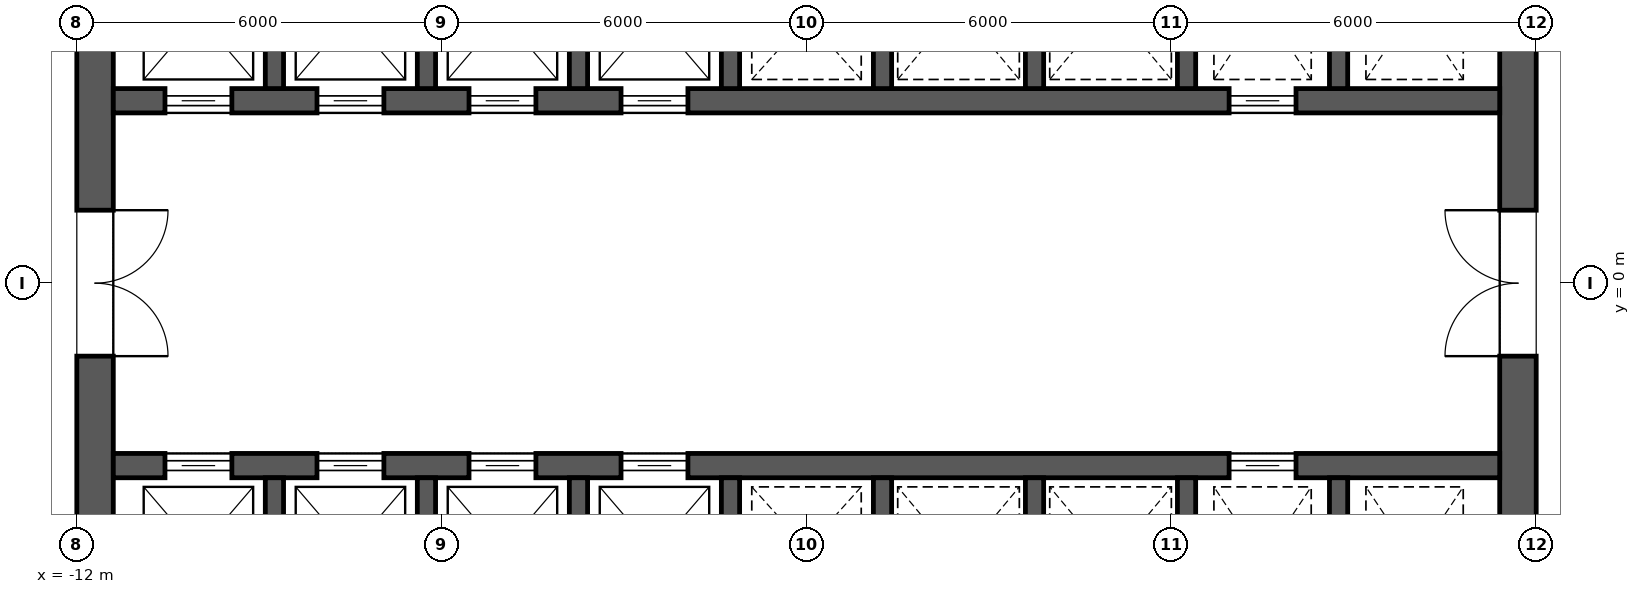
"""IFC4 building model, lengths in metres.
Left out: names, types, materials, properties, quantities, classifications, styles, units other than length and angle.
Written with IfcOpenShell. Run it as: python <this file> out.ifc"""

import sys

from ifc_helpers import new_model, si_unit, direction, frame, frame_2d, origin, place, context, subcontext, project, spatial, rectangle, extrude, element, fill, save


model = new_model("IFC4")
c1 = context("Model", 3, precision=1e-05, world=origin(), true_north=direction((0.0, 1.0)))
c2 = subcontext(c1, "Body", "Model", "MODEL_VIEW")
j1 = project(units=[si_unit("LENGTHUNIT", "METRE"), si_unit("PLANEANGLEUNIT", "RADIAN")], contexts=[c1])
p1 = place(None, origin())
s1 = spatial("IfcSite", under=j1, at=p1, CompositionType="ELEMENT")
p2 = place(p1, origin())
s2 = spatial("IfcBuilding", under=s1, at=p2, CompositionType="ELEMENT")
p3 = place(p2, frame((0.0, 0.0, 44.5)))
s3 = spatial("IfcBuildingStorey", under=s2, at=p3, CompositionType="ELEMENT", Elevation=44.5)
p4 = place(p3, frame((11.7, -11.4, 0.0), z_axis=(0.0, 0.0, 1.0), x_axis=(0.0, 1.0, 0.0)))
e1 = element("IfcWall", 1, at=p4, inside=s3, PredefinedType="SHEAR", context=c2, shape_type="SweptSolid", body=[
    extrude(rectangle(XDim=22.8, YDim=0.6, at=frame_2d((11.4, 0.0))), origin(), (0.0, 0.0, 1.0), 4.2),
])
p5 = place(p4, frame((10.2, 0.0, 0.0)))
e2 = element("IfcOpeningElement", 2, at=p5, cuts=e1, PredefinedType="OPENING", context=c2, shape_type="SweptSolid", body=[
    extrude(rectangle(XDim=2.4, YDim=2.1, at=frame_2d((1.2, 1.05))), frame((0.0, 0.312, 0.0), z_axis=(0.0, -1.0, 0.0), x_axis=(1.0, 0.0, 0.0)), (0.0, 0.0, 1.0), 0.624),
])
p6 = place(p4, frame((19.5, 0.0, 0.0)))
e3 = element("IfcOpeningElement", 3, at=p6, cuts=e1, PredefinedType="OPENING", context=c2, shape_type="SweptSolid", body=[
    extrude(rectangle(XDim=1.2, YDim=2.1, at=frame_2d((0.6, 1.05))), frame((0.0, 0.312, 0.0), z_axis=(0.0, -1.0, 0.0), x_axis=(1.0, 0.0, 0.0)), (0.0, 0.0, 1.0), 0.624),
])
p7 = place(p4, frame((2.1, 0.0, 0.0)))
e4 = element("IfcOpeningElement", 4, at=p7, cuts=e1, PredefinedType="OPENING", context=c2, shape_type="SweptSolid", body=[
    extrude(rectangle(XDim=1.2, YDim=2.1, at=frame_2d((0.6, 1.05))), frame((0.0, 0.312, 0.0), z_axis=(0.0, -1.0, 0.0), x_axis=(1.0, 0.0, 0.0)), (0.0, 0.0, 1.0), 0.624),
])
p8 = place(p3, frame((-11.7, -11.4, 0.0), z_axis=(0.0, 0.0, 1.0), x_axis=(0.0, 1.0, 0.0)))
e5 = element("IfcWall", 5, at=p8, inside=s3, PredefinedType="SHEAR", context=c2, shape_type="SweptSolid", body=[
    extrude(rectangle(XDim=22.8, YDim=0.6, at=frame_2d((11.4, 0.0))), origin(), (0.0, 0.0, 1.0), 4.2),
])
p9 = place(p8, frame((10.2, 0.0, 0.0)))
e6 = element("IfcOpeningElement", 6, at=p9, cuts=e5, PredefinedType="OPENING", context=c2, shape_type="SweptSolid", body=[
    extrude(rectangle(XDim=2.4, YDim=2.1, at=frame_2d((1.2, 1.05))), frame((0.0, 0.312, 0.0), z_axis=(0.0, -1.0, 0.0), x_axis=(1.0, 0.0, 0.0)), (0.0, 0.0, 1.0), 0.624),
])
p10 = place(p8, frame((18.925, 0.0, 0.0)))
e7 = element("IfcOpeningElement", 7, at=p10, cuts=e5, PredefinedType="OPENING", context=c2, shape_type="SweptSolid", body=[
    extrude(rectangle(XDim=1.2, YDim=2.1, at=frame_2d((0.6, 1.05))), frame((0.0, 0.312, 0.0), z_axis=(0.0, -1.0, 0.0), x_axis=(1.0, 0.0, 0.0)), (0.0, 0.0, 1.0), 0.624),
])
p11 = place(p8, frame((2.675, 0.0, 0.0)))
e8 = element("IfcOpeningElement", 8, at=p11, cuts=e5, PredefinedType="OPENING", context=c2, shape_type="SweptSolid", body=[
    extrude(rectangle(XDim=1.2, YDim=2.1, at=frame_2d((0.6, 1.05))), frame((0.0, 0.312, 0.0), z_axis=(0.0, -1.0, 0.0), x_axis=(1.0, 0.0, 0.0)), (0.0, 0.0, 1.0), 0.624),
])
p12 = place(p3, frame((-11.4, 3.0, 0.0), z_axis=(0.0, 0.0, 1.0), x_axis=(1.0, 0.0, 0.0)))
e9 = element("IfcWall", 9, at=p12, inside=s3, PredefinedType="SHEAR", context=c2, shape_type="SweptSolid", body=[
    extrude(rectangle(XDim=22.8, YDim=0.4, at=frame_2d((11.4, 0.0))), origin(), (0.0, 0.0, 1.0), 4.2),
])
p13 = place(p12, frame((0.85, 0.0, 0.0)))
e10 = element("IfcOpeningElement", 10, at=p13, cuts=e9, PredefinedType="OPENING", context=c2, shape_type="SweptSolid", body=[
    extrude(rectangle(XDim=1.1, YDim=2.1, at=frame_2d((0.55, 1.05))), frame((0.0, 0.212, 0.0), z_axis=(0.0, -1.0, 0.0), x_axis=(1.0, 0.0, 0.0)), (0.0, 0.0, 1.0), 0.424),
])
p14 = place(p12, frame((3.35, 0.0, 0.0)))
e11 = element("IfcOpeningElement", 11, at=p14, cuts=e9, PredefinedType="OPENING", context=c2, shape_type="SweptSolid", body=[
    extrude(rectangle(XDim=1.1, YDim=2.1, at=frame_2d((0.55, 1.05))), frame((0.0, 0.212, 0.0), z_axis=(0.0, -1.0, 0.0), x_axis=(1.0, 0.0, 0.0)), (0.0, 0.0, 1.0), 0.424),
])
p15 = place(p12, frame((5.85, 0.0, 0.0)))
e12 = element("IfcOpeningElement", 12, at=p15, cuts=e9, PredefinedType="OPENING", context=c2, shape_type="SweptSolid", body=[
    extrude(rectangle(XDim=1.1, YDim=2.1, at=frame_2d((0.55, 1.05))), frame((0.0, 0.212, 0.0), z_axis=(0.0, -1.0, 0.0), x_axis=(1.0, 0.0, 0.0)), (0.0, 0.0, 1.0), 0.424),
])
p16 = place(p12, frame((8.35, 0.0, 0.0)))
e13 = element("IfcOpeningElement", 13, at=p16, cuts=e9, PredefinedType="OPENING", context=c2, shape_type="SweptSolid", body=[
    extrude(rectangle(XDim=1.1, YDim=2.1, at=frame_2d((0.55, 1.05))), frame((0.0, 0.212, 0.0), z_axis=(0.0, -1.0, 0.0), x_axis=(1.0, 0.0, 0.0)), (0.0, 0.0, 1.0), 0.424),
])
p17 = place(p12, frame((18.35, 0.0, 0.0)))
e14 = element("IfcOpeningElement", 14, at=p17, cuts=e9, PredefinedType="OPENING", context=c2, shape_type="SweptSolid", body=[
    extrude(rectangle(XDim=1.1, YDim=2.1, at=frame_2d((0.55, 1.05))), frame((0.0, 0.212, 0.0), z_axis=(0.0, -1.0, 0.0), x_axis=(1.0, 0.0, 0.0)), (0.0, 0.0, 1.0), 0.424),
])
for number, where, z_axis, x_axis in (
    (15, (-8.75, 3.2, 0.0), (0.0, 0.0, 1.0), (0.0, 1.0, 0.0)),
    (16, (-6.25, 3.2, 0.0), (0.0, 0.0, 1.0), (0.0, 1.0, 0.0)),
    (17, (-3.75, 3.2, 0.0), (0.0, 0.0, 1.0), (0.0, 1.0, 0.0)),
    (18, (-1.25, 3.2, 0.0), (0.0, 0.0, 1.0), (0.0, 1.0, 0.0)),
    (19, (1.25, 3.2, 0.0), (0.0, 0.0, 1.0), (0.0, 1.0, 0.0)),
    (20, (3.75, 3.2, 0.0), (0.0, 0.0, 1.0), (0.0, 1.0, 0.0)),
    (21, (6.25, 3.2, 0.0), (0.0, 0.0, 1.0), (0.0, 1.0, 0.0)),
    (22, (8.75, 3.2, 0.0), (0.0, 0.0, 1.0), (0.0, 1.0, 0.0)),
):
    element("IfcWall", number, at=place(p3, frame(where, z_axis=z_axis, x_axis=x_axis)), inside=s3, PredefinedType="SHEAR", context=c2, shape_type="SweptSolid", body=[
        extrude(rectangle(XDim=2.9, YDim=0.3, at=frame_2d((1.45, 0.0))), origin(), (0.0, 0.0, 1.0), 4.2),
    ])
p18 = place(p3, frame((-11.4, -3.0, 0.0), z_axis=(0.0, 0.0, 1.0), x_axis=(1.0, 0.0, 0.0)))
e23 = element("IfcWall", 23, at=p18, inside=s3, PredefinedType="SHEAR", context=c2, shape_type="SweptSolid", body=[
    extrude(rectangle(XDim=22.8, YDim=0.4, at=frame_2d((11.4, 0.0))), origin(), (0.0, 0.0, 1.0), 4.2),
])
p19 = place(p18, frame((0.85, 0.0, 0.0)))
e24 = element("IfcOpeningElement", 24, at=p19, cuts=e23, PredefinedType="OPENING", context=c2, shape_type="SweptSolid", body=[
    extrude(rectangle(XDim=1.1, YDim=2.1, at=frame_2d((0.55, 1.05))), frame((0.0, 0.212, 0.0), z_axis=(0.0, -1.0, 0.0), x_axis=(1.0, 0.0, 0.0)), (0.0, 0.0, 1.0), 0.424),
])
p20 = place(p18, frame((3.35, 0.0, 0.0)))
e25 = element("IfcOpeningElement", 25, at=p20, cuts=e23, PredefinedType="OPENING", context=c2, shape_type="SweptSolid", body=[
    extrude(rectangle(XDim=1.1, YDim=2.1, at=frame_2d((0.55, 1.05))), frame((0.0, 0.212, 0.0), z_axis=(0.0, -1.0, 0.0), x_axis=(1.0, 0.0, 0.0)), (0.0, 0.0, 1.0), 0.424),
])
p21 = place(p18, frame((5.85, 0.0, 0.0)))
e26 = element("IfcOpeningElement", 26, at=p21, cuts=e23, PredefinedType="OPENING", context=c2, shape_type="SweptSolid", body=[
    extrude(rectangle(XDim=1.1, YDim=2.1, at=frame_2d((0.55, 1.05))), frame((0.0, 0.212, 0.0), z_axis=(0.0, -1.0, 0.0), x_axis=(1.0, 0.0, 0.0)), (0.0, 0.0, 1.0), 0.424),
])
p22 = place(p18, frame((8.35, 0.0, 0.0)))
e27 = element("IfcOpeningElement", 27, at=p22, cuts=e23, PredefinedType="OPENING", context=c2, shape_type="SweptSolid", body=[
    extrude(rectangle(XDim=1.1, YDim=2.1, at=frame_2d((0.55, 1.05))), frame((0.0, 0.212, 0.0), z_axis=(0.0, -1.0, 0.0), x_axis=(1.0, 0.0, 0.0)), (0.0, 0.0, 1.0), 0.424),
])
p23 = place(p18, frame((18.35, 0.0, 0.0)))
e28 = element("IfcOpeningElement", 28, at=p23, cuts=e23, PredefinedType="OPENING", context=c2, shape_type="SweptSolid", body=[
    extrude(rectangle(XDim=1.1, YDim=2.1, at=frame_2d((0.55, 1.05))), frame((0.0, 0.212, 0.0), z_axis=(0.0, -1.0, 0.0), x_axis=(1.0, 0.0, 0.0)), (0.0, 0.0, 1.0), 0.424),
])
for number, where, z_axis, x_axis in (
    (29, (-8.75, -6.1, 0.0), (0.0, 0.0, 1.0), (0.0, 1.0, 0.0)),
    (30, (-6.25, -6.1, 0.0), (0.0, 0.0, 1.0), (0.0, 1.0, 0.0)),
    (31, (-3.75, -6.1, 0.0), (0.0, 0.0, 1.0), (0.0, 1.0, 0.0)),
    (32, (-1.25, -6.1, 0.0), (0.0, 0.0, 1.0), (0.0, 1.0, 0.0)),
    (33, (1.25, -6.1, 0.0), (0.0, 0.0, 1.0), (0.0, 1.0, 0.0)),
    (34, (3.75, -6.1, 0.0), (0.0, 0.0, 1.0), (0.0, 1.0, 0.0)),
    (35, (6.25, -6.1, 0.0), (0.0, 0.0, 1.0), (0.0, 1.0, 0.0)),
    (36, (8.75, -6.1, 0.0), (0.0, 0.0, 1.0), (0.0, 1.0, 0.0)),
):
    element("IfcWall", number, at=place(p3, frame(where, z_axis=z_axis, x_axis=x_axis)), inside=s3, PredefinedType="SHEAR", context=c2, shape_type="SweptSolid", body=[
        extrude(rectangle(XDim=2.9, YDim=0.3, at=frame_2d((1.45, 0.0))), origin(), (0.0, 0.0, 1.0), 4.2),
    ])
p24 = place(p13, origin())
e37 = element("IfcDoor", 37, at=p24, inside=s3, OperationType="SLIDING_TO_LEFT", PredefinedType="DOOR", context=c2, shape_type="SweptSolid", body=[
    extrude(rectangle(XDim=1.1, YDim=2.1, at=frame_2d((0.55, 1.05))), frame((0.0, 0.025, 0.0), z_axis=(0.0, -1.0, 0.0), x_axis=(1.0, 0.0, 0.0)), (0.0, 0.0, 1.0), 0.05),
])
fill(e10, e37)
p25 = place(p14, origin())
e38 = element("IfcDoor", 38, at=p25, inside=s3, OperationType="SLIDING_TO_LEFT", PredefinedType="DOOR", context=c2, shape_type="SweptSolid", body=[
    extrude(rectangle(XDim=1.1, YDim=2.1, at=frame_2d((0.55, 1.05))), frame((0.0, 0.025, 0.0), z_axis=(0.0, -1.0, 0.0), x_axis=(1.0, 0.0, 0.0)), (0.0, 0.0, 1.0), 0.05),
])
fill(e11, e38)
p26 = place(p15, origin())
e39 = element("IfcDoor", 39, at=p26, inside=s3, OperationType="SLIDING_TO_LEFT", PredefinedType="DOOR", context=c2, shape_type="SweptSolid", body=[
    extrude(rectangle(XDim=1.1, YDim=2.1, at=frame_2d((0.55, 1.05))), frame((0.0, 0.025, 0.0), z_axis=(0.0, -1.0, 0.0), x_axis=(1.0, 0.0, 0.0)), (0.0, 0.0, 1.0), 0.05),
])
fill(e12, e39)
p27 = place(p16, origin())
e40 = element("IfcDoor", 40, at=p27, inside=s3, OperationType="SLIDING_TO_LEFT", PredefinedType="DOOR", context=c2, shape_type="SweptSolid", body=[
    extrude(rectangle(XDim=1.1, YDim=2.1, at=frame_2d((0.55, 1.05))), frame((0.0, 0.025, 0.0), z_axis=(0.0, -1.0, 0.0), x_axis=(1.0, 0.0, 0.0)), (0.0, 0.0, 1.0), 0.05),
])
fill(e13, e40)
p28 = place(p19, origin())
e41 = element("IfcDoor", 41, at=p28, inside=s3, OperationType="SLIDING_TO_LEFT", PredefinedType="DOOR", context=c2, shape_type="SweptSolid", body=[
    extrude(rectangle(XDim=1.1, YDim=2.1, at=frame_2d((0.55, 1.05))), frame((0.0, 0.025, 0.0), z_axis=(0.0, -1.0, 0.0), x_axis=(1.0, 0.0, 0.0)), (0.0, 0.0, 1.0), 0.05),
])
fill(e24, e41)
p29 = place(p20, origin())
e42 = element("IfcDoor", 42, at=p29, inside=s3, OperationType="SLIDING_TO_LEFT", PredefinedType="DOOR", context=c2, shape_type="SweptSolid", body=[
    extrude(rectangle(XDim=1.1, YDim=2.1, at=frame_2d((0.55, 1.05))), frame((0.0, 0.025, 0.0), z_axis=(0.0, -1.0, 0.0), x_axis=(1.0, 0.0, 0.0)), (0.0, 0.0, 1.0), 0.05),
])
fill(e25, e42)
p30 = place(p21, origin())
e43 = element("IfcDoor", 43, at=p30, inside=s3, OperationType="SLIDING_TO_LEFT", PredefinedType="DOOR", context=c2, shape_type="SweptSolid", body=[
    extrude(rectangle(XDim=1.1, YDim=2.1, at=frame_2d((0.55, 1.05))), frame((0.0, 0.025, 0.0), z_axis=(0.0, -1.0, 0.0), x_axis=(1.0, 0.0, 0.0)), (0.0, 0.0, 1.0), 0.05),
])
fill(e26, e43)
p31 = place(p22, origin())
e44 = element("IfcDoor", 44, at=p31, inside=s3, OperationType="SLIDING_TO_LEFT", PredefinedType="DOOR", context=c2, shape_type="SweptSolid", body=[
    extrude(rectangle(XDim=1.1, YDim=2.1, at=frame_2d((0.55, 1.05))), frame((0.0, 0.025, 0.0), z_axis=(0.0, -1.0, 0.0), x_axis=(1.0, 0.0, 0.0)), (0.0, 0.0, 1.0), 0.05),
])
fill(e27, e44)
p32 = place(p17, origin())
e45 = element("IfcDoor", 45, at=p32, inside=s3, OperationType="SLIDING_TO_LEFT", PredefinedType="DOOR", context=c2, shape_type="SweptSolid", body=[
    extrude(rectangle(XDim=1.1, YDim=2.1, at=frame_2d((0.55, 1.05))), frame((0.0, 0.025, 0.0), z_axis=(0.0, -1.0, 0.0), x_axis=(1.0, 0.0, 0.0)), (0.0, 0.0, 1.0), 0.05),
])
fill(e14, e45)
p33 = place(p23, origin())
e46 = element("IfcDoor", 46, at=p33, inside=s3, OperationType="SLIDING_TO_LEFT", PredefinedType="DOOR", context=c2, shape_type="SweptSolid", body=[
    extrude(rectangle(XDim=1.1, YDim=2.1, at=frame_2d((0.55, 1.05))), frame((0.0, 0.025, 0.0), z_axis=(0.0, -1.0, 0.0), x_axis=(1.0, 0.0, 0.0)), (0.0, 0.0, 1.0), 0.05),
])
fill(e28, e46)
p34 = place(p9, frame((2.4, 0.0, 0.0), z_axis=(0.0, 0.0, 1.0), x_axis=(-1.0, 0.0, 0.0)))
e47 = element("IfcDoor", 47, at=p34, inside=s3, OperationType="DOUBLE_DOOR_SINGLE_SWING", PredefinedType="DOOR", context=c2, shape_type="SweptSolid", body=[
    extrude(rectangle(XDim=2.4, YDim=2.1, at=frame_2d((1.2, 1.05))), frame((0.0, 0.025, 0.0), z_axis=(0.0, -1.0, 0.0), x_axis=(1.0, 0.0, 0.0)), (0.0, 0.0, 1.0), 0.05),
])
fill(e6, e47)
p35 = place(p5, origin())
e48 = element("IfcDoor", 48, at=p35, inside=s3, OperationType="DOUBLE_DOOR_SINGLE_SWING", PredefinedType="DOOR", context=c2, shape_type="SweptSolid", body=[
    extrude(rectangle(XDim=2.4, YDim=2.1, at=frame_2d((1.2, 1.05))), frame((0.0, 0.025, 0.0), z_axis=(0.0, -1.0, 0.0), x_axis=(1.0, 0.0, 0.0)), (0.0, 0.0, 1.0), 0.05),
])
fill(e2, e48)
save(model, sys.argv[1])
